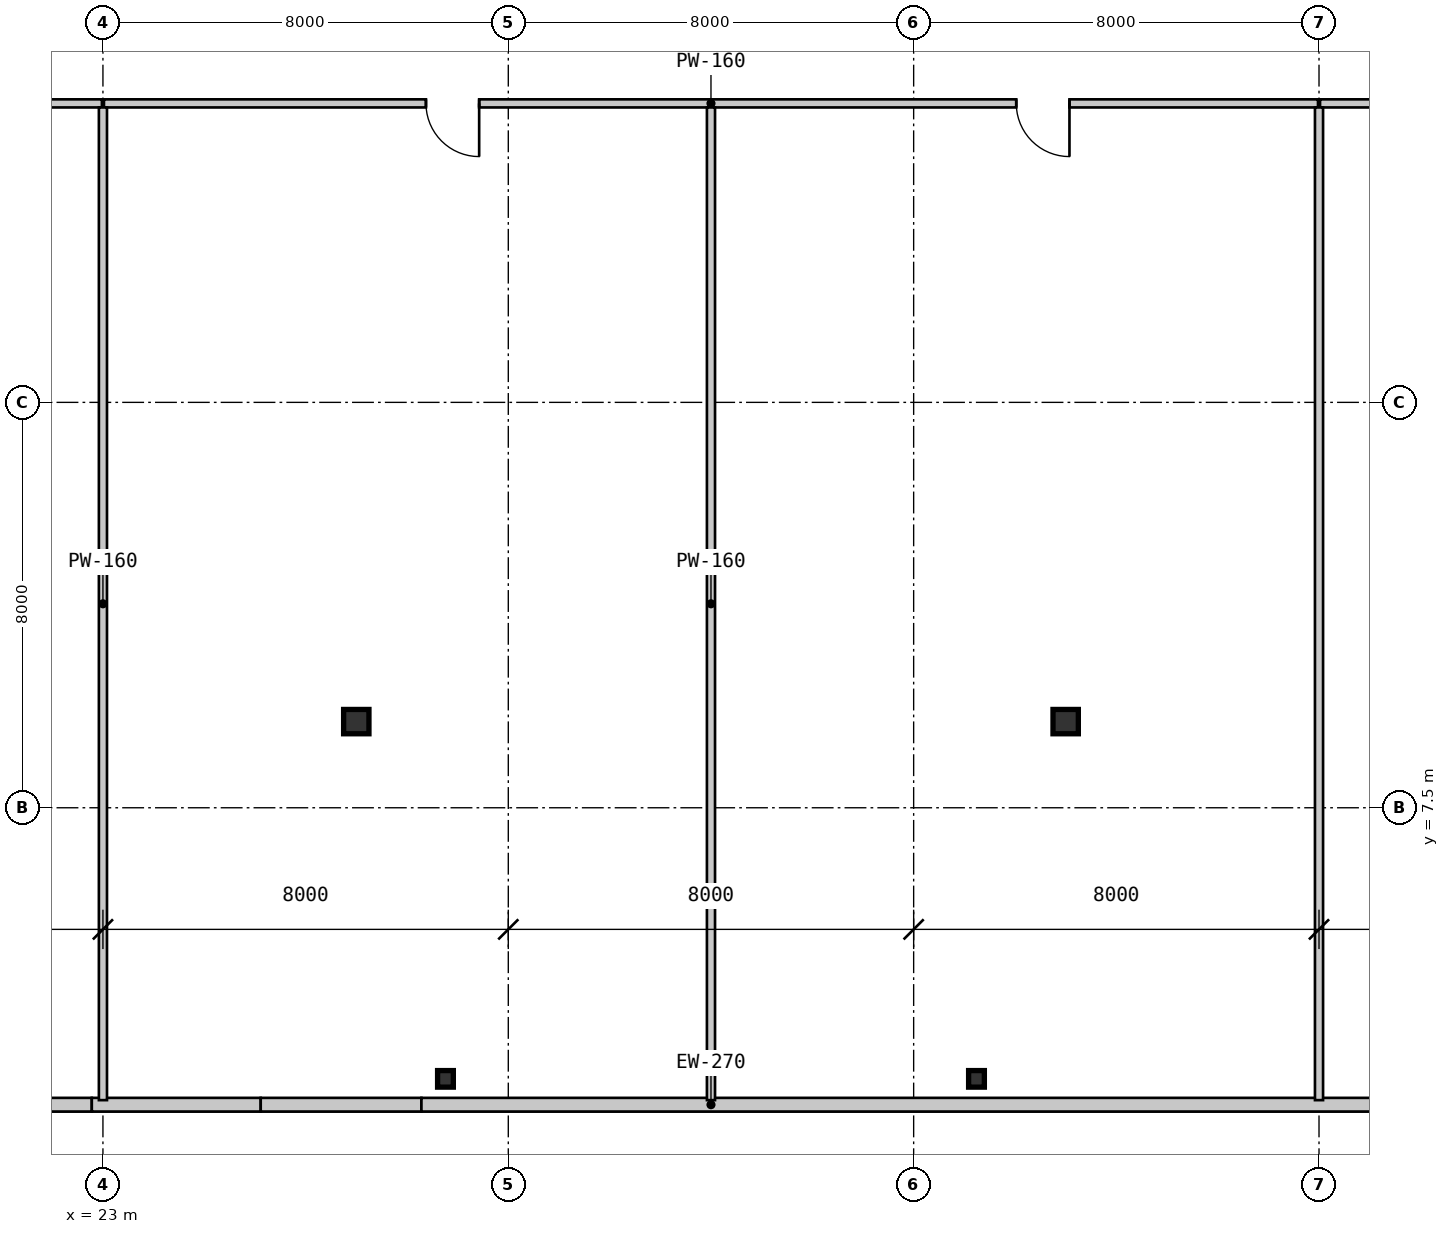
"""IFC4 building model, lengths in metres.
Left out: names, types, materials, properties, quantities, classifications, styles, units other than length and angle.
Written with IfcOpenShell. Run it as: python <this file> out.ifc"""

import sys

from ifc_helpers import new_model, si_unit, direction, frame, frame_2d, origin, origin_2d, place, context, subcontext, project, spatial, rectangle, i_section, extrude, source, transform, mapped, element, fill, save


model = new_model("IFC4")
c1 = context("Model", 3, precision=1e-05, world=origin(), true_north=direction((0.0, 1.0)))
c2 = subcontext(c1, "Body", "Model", "MODEL_VIEW")
j1 = project(units=[si_unit("LENGTHUNIT", "METRE"), si_unit("PLANEANGLEUNIT", "RADIAN")], contexts=[c1])
p1 = place(None, origin())
s1 = spatial("IfcSite", under=j1, at=p1, CompositionType="ELEMENT")
p2 = place(p1, origin())
s2 = spatial("IfcBuilding", under=s1, at=p2, CompositionType="ELEMENT")
p3 = place(p2, frame((0.0, 0.0, 60.9)))
s3 = spatial("IfcBuildingStorey", under=s2, at=p3, CompositionType="ELEMENT", Elevation=60.9)
m1 = source(origin(), c2, "Body", "SweptSolid", [
    extrude(i_section(OverallWidth=0.5, OverallDepth=0.48, WebThickness=0.028, FlangeThickness=0.044, at=origin_2d()), origin(), (0.0, 0.0, 1.0), 4.2),
])
for number, where, z_axis, x_axis in (
    (1, (28.0, 9.2, 0.0), (0.0, 0.0, 1.0), (1.0, 0.0, 0.0)),
    (2, (42.0, 9.2, 0.0), (0.0, 0.0, 1.0), (1.0, 0.0, 0.0)),
):
    element("IfcColumn", number, at=place(p3, frame(where, z_axis=z_axis, x_axis=x_axis)), inside=s3, PredefinedType="COLUMN", context=c2, shape_type="MappedRepresentation", body=[
        mapped(m1, transform((0.0, 0.0, 0.0), scale=1.0)),
    ])
m2 = source(origin(), c2, "Body", "SweptSolid", [
    extrude(i_section(OverallWidth=0.311, OverallDepth=0.327, WebThickness=0.016, FlangeThickness=0.025, at=origin_2d()), origin(), (0.0, 0.0, 1.0), 4.2),
])
for number, where, z_axis, x_axis in (
    (3, (29.76, 2.15, 0.0), (0.0, 0.0, 1.0), (1.0, 0.0, 0.0)),
    (4, (40.24, 2.15, 0.0), (0.0, 0.0, 1.0), (1.0, 0.0, 0.0)),
):
    element("IfcColumn", number, at=place(p3, frame(where, z_axis=z_axis, x_axis=x_axis)), inside=s3, PredefinedType="COLUMN", context=c2, shape_type="MappedRepresentation", body=[
        mapped(m2, transform((0.0, 0.0, 0.0), scale=1.0)),
    ])
m3 = source(origin(), c2, "Body", "SweptSolid", [
    extrude(rectangle(XDim=2.804, YDim=0.27, at=frame_2d((1.402, 0.0))), origin(), (0.0, 0.0, 1.0), 2.756),
])
p4 = place(p3, frame((19.976, 1.64, 0.0), z_axis=(0.0, 0.0, 1.0), x_axis=(1.0, 0.0, 0.0)))
e5 = element("IfcWall", 5, at=p4, inside=s3, PredefinedType="SOLIDWALL", context=c2, shape_type="MappedRepresentation", body=[
    mapped(m3, transform((0.0, 0.0, 0.0), scale=1.0)),
])
m4 = source(origin(), c2, "Body", "SweptSolid", [
    extrude(rectangle(XDim=3.333, YDim=0.27, at=frame_2d((1.667, 0.0))), origin(), (0.0, 0.0, 1.0), 3.78),
])
p5 = place(p3, frame((22.781, 1.64, 0.0), z_axis=(0.0, 0.0, 1.0), x_axis=(1.0, 0.0, 0.0)))
e6 = element("IfcWall", 6, at=p5, inside=s3, PredefinedType="SOLIDWALL", context=c2, shape_type="MappedRepresentation", body=[
    mapped(m4, transform((0.0, 0.0, 0.0), scale=1.0)),
])
m5 = source(origin(), c2, "Body", "SweptSolid", [
    extrude(rectangle(XDim=3.172, YDim=0.27, at=frame_2d((1.586, 0.0))), origin(), (0.0, 0.0, 1.0), 2.58),
])
p6 = place(p3, frame((26.114, 1.64, 0.0), z_axis=(0.0, 0.0, 1.0), x_axis=(1.0, 0.0, 0.0)))
e7 = element("IfcWall", 7, at=p6, inside=s3, PredefinedType="SOLIDWALL", context=c2, shape_type="MappedRepresentation", body=[
    mapped(m5, transform((0.0, 0.0, 0.0), scale=1.0)),
])
m6 = source(origin(), c2, "Body", "SweptSolid", [
    extrude(rectangle(XDim=32.714, YDim=0.27, at=frame_2d((16.357, 0.0))), origin(), (0.0, 0.0, 1.0), 3.78),
])
p7 = place(p3, frame((29.286, 1.64, 0.0), z_axis=(0.0, 0.0, 1.0), x_axis=(1.0, 0.0, 0.0)))
e8 = element("IfcWall", 8, at=p7, inside=s3, PredefinedType="SOLIDWALL", context=c2, shape_type="MappedRepresentation", body=[
    mapped(m6, transform((0.0, 0.0, 0.0), scale=1.0)),
])
m7 = source(origin(), c2, "Body", "SweptSolid", [
    extrude(rectangle(XDim=10.9, YDim=0.16, at=frame_2d((5.45, 0.0))), origin(), (0.0, 0.0, 1.0), 3.78),
])
p8 = place(p3, frame((22.98, 21.4, 0.0), z_axis=(0.0, 0.0, 1.0), x_axis=(-1.0, 0.0, 0.0)))
e9 = element("IfcWall", 9, at=p8, inside=s3, PredefinedType="PARTITIONING", context=c2, shape_type="MappedRepresentation", body=[
    mapped(m7, transform((0.0, 0.0, 0.0), scale=1.0)),
])
m8 = source(origin(), c2, "Body", "SweptSolid", [
    extrude(rectangle(XDim=1.05, YDim=2.1, at=frame_2d((0.525, 1.05))), frame((0.0, 0.09, 0.0), z_axis=(0.0, -1.0, 0.0), x_axis=(1.0, 0.0, 0.0)), (0.0, 0.0, 1.0), 0.18),
])
p9 = place(p8, frame((5.825, 0.0, 0.0)))
e10 = element("IfcOpeningElement", 10, at=p9, cuts=e9, PredefinedType="OPENING", context=c2, shape_type="MappedRepresentation", body=[
    mapped(m8, transform((0.0, 0.0, 0.0), scale=1.0)),
])
m9 = source(origin(), c2, "Body", "SweptSolid", [
    extrude(rectangle(XDim=11.959, YDim=0.16, at=frame_2d((5.98, 0.0))), origin(), (0.0, 0.0, 1.0), 3.78),
])
p10 = place(p3, frame((34.98, 21.4, 0.0), z_axis=(0.0, 0.0, 1.0), x_axis=(-1.0, 0.0, 0.0)))
e11 = element("IfcWall", 11, at=p10, inside=s3, PredefinedType="PARTITIONING", context=c2, shape_type="MappedRepresentation", body=[
    mapped(m9, transform((0.0, 0.0, 0.0), scale=1.0)),
])
p11 = place(p10, frame((4.555, 0.0, 0.0)))
e12 = element("IfcOpeningElement", 12, at=p11, cuts=e11, PredefinedType="OPENING", context=c2, shape_type="MappedRepresentation", body=[
    mapped(m8, transform((0.0, 0.0, 0.0), scale=1.0)),
])
p12 = place(p3, frame((46.98, 21.4, 0.0), z_axis=(0.0, 0.0, 1.0), x_axis=(-1.0, 0.0, 0.0)))
e13 = element("IfcWall", 13, at=p12, inside=s3, PredefinedType="PARTITIONING", context=c2, shape_type="MappedRepresentation", body=[
    mapped(m9, transform((0.0, 0.0, 0.0), scale=1.0)),
])
p13 = place(p12, frame((4.905, 0.0, 0.0)))
e14 = element("IfcOpeningElement", 14, at=p13, cuts=e13, PredefinedType="OPENING", context=c2, shape_type="MappedRepresentation", body=[
    mapped(m8, transform((0.0, 0.0, 0.0), scale=1.0)),
])
p14 = place(p3, frame((57.92, 21.4, 0.0), z_axis=(0.0, 0.0, 1.0), x_axis=(-1.0, 0.0, 0.0)))
e15 = element("IfcWall", 15, at=p14, inside=s3, PredefinedType="PARTITIONING", context=c2, shape_type="MappedRepresentation", body=[
    mapped(m7, transform((0.0, 0.0, 0.0), scale=1.0)),
])
p15 = place(p14, frame((4.025, 0.0, 0.0)))
e16 = element("IfcOpeningElement", 16, at=p15, cuts=e15, PredefinedType="OPENING", context=c2, shape_type="MappedRepresentation", body=[
    mapped(m8, transform((0.0, 0.0, 0.0), scale=1.0)),
])
m10 = source(origin(), c2, "Body", "SweptSolid", [
    extrude(rectangle(XDim=19.59, YDim=0.16, at=frame_2d((9.795, 0.0))), origin(), (0.0, 0.0, 1.0), 3.78),
])
for number, where, z_axis, x_axis in (
    (17, (23.0, 21.32, 0.0), (0.0, 0.0, 1.0), (0.0, -1.0, 0.0)),
    (18, (35.0, 21.32, 0.0), (0.0, 0.0, 1.0), (0.0, -1.0, 0.0)),
    (19, (47.0, 21.32, 0.0), (0.0, 0.0, 1.0), (0.0, -1.0, 0.0)),
):
    element("IfcWall", number, at=place(p3, frame(where, z_axis=z_axis, x_axis=x_axis)), inside=s3, PredefinedType="PARTITIONING", context=c2, shape_type="MappedRepresentation", body=[
        mapped(m10, transform((0.0, 0.0, 0.0), scale=1.0)),
    ])
m11 = source(origin(), c2, "Body", "SweptSolid", [
    extrude(rectangle(XDim=1.05, YDim=2.1, at=frame_2d((0.525, 1.05))), frame((0.0, 0.025, 0.0), z_axis=(0.0, -1.0, 0.0), x_axis=(1.0, 0.0, 0.0)), (0.0, 0.0, 1.0), 0.05),
])
p16 = place(p11, origin())
e20 = element("IfcDoor", 20, at=p16, inside=s3, OperationType="SINGLE_SWING_LEFT", PredefinedType="DOOR", context=c2, shape_type="MappedRepresentation", body=[
    mapped(m11, transform((0.0, 0.0, 0.0), scale=1.0)),
])
fill(e12, e20)
p17 = place(p13, origin())
e21 = element("IfcDoor", 21, at=p17, inside=s3, OperationType="SINGLE_SWING_LEFT", PredefinedType="DOOR", context=c2, shape_type="MappedRepresentation", body=[
    mapped(m11, transform((0.0, 0.0, 0.0), scale=1.0)),
])
fill(e14, e21)
save(model, sys.argv[1])
